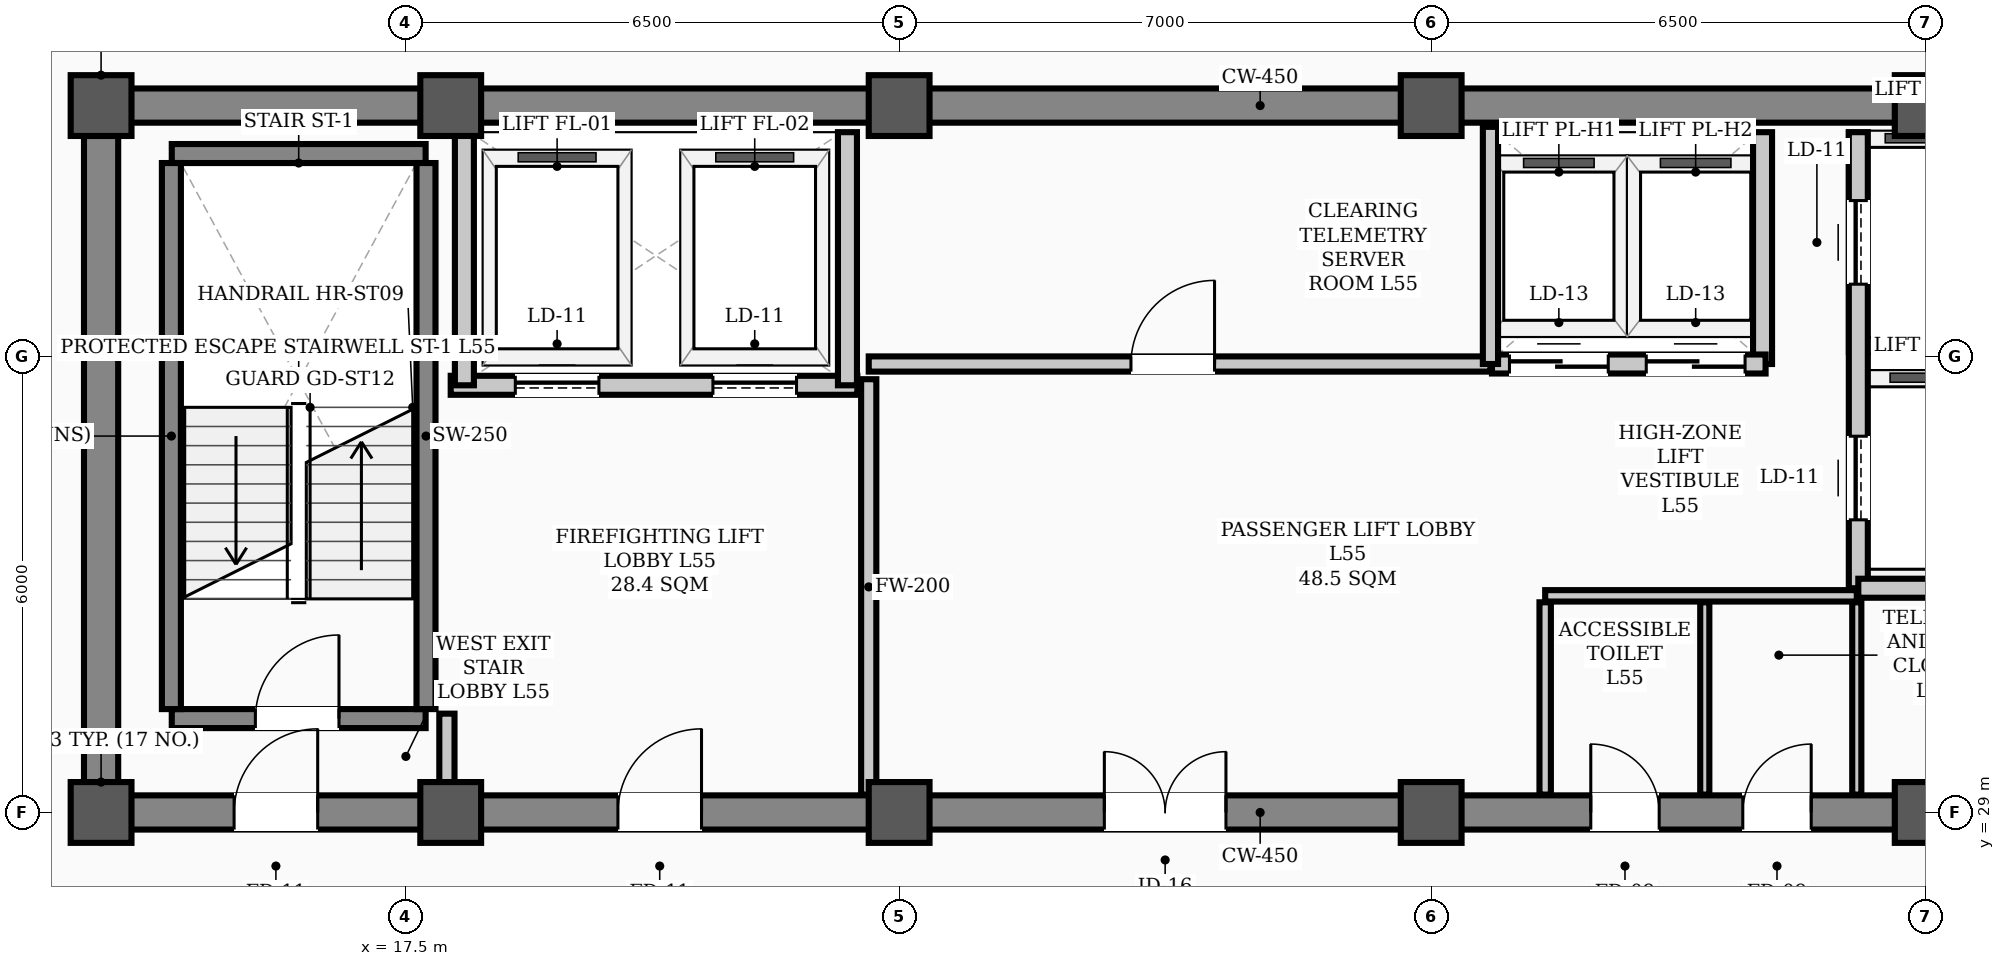
"""IFC4 building model, lengths in metres.
Left out: names, types, materials, properties, quantities, classifications, styles, units other than length and angle.
Written with IfcOpenShell. Run it as: python <this file> out.ifc"""

import sys

from ifc_helpers import new_model, si_unit, direction, frame, frame_2d, origin, origin_2d, place, context, subcontext, project, spatial, rectangle, hollow_rectangle, extrude, element, fill, save


model = new_model("IFC4")
c1 = context("Model", 3, precision=1e-05, world=origin(), true_north=direction((0.0, 1.0)))
c2 = subcontext(c1, "Body", "Model", "MODEL_VIEW")
j1 = project(units=[si_unit("LENGTHUNIT", "METRE"), si_unit("PLANEANGLEUNIT", "RADIAN")], contexts=[c1])
p1 = place(None, origin())
s1 = spatial("IfcSite", under=j1, at=p1, CompositionType="ELEMENT")
p2 = place(p1, origin())
s2 = spatial("IfcBuilding", under=s1, at=p2, CompositionType="ELEMENT")
p3 = place(p2, frame((0.0, 0.0, 222.8)))
s3 = spatial("IfcBuildingStorey", under=s2, at=p3, CompositionType="ELEMENT", Elevation=222.8)
for number, where, z_axis, x_axis in (
    (1, (13.5, 29.0, 0.0), (0.0, 0.0, 1.0), (1.0, 0.0, 0.0)),
    (2, (13.5, 38.3, 0.0), (0.0, 0.0, 1.0), (1.0, 0.0, 0.0)),
    (3, (18.1, 29.0, 0.0), (0.0, 0.0, 1.0), (1.0, 0.0, 0.0)),
    (4, (18.1, 38.3, 0.0), (0.0, 0.0, 1.0), (1.0, 0.0, 0.0)),
    (5, (24.0, 29.0, 0.0), (0.0, 0.0, 1.0), (1.0, 0.0, 0.0)),
    (6, (24.0, 38.3, 0.0), (0.0, 0.0, 1.0), (1.0, 0.0, 0.0)),
    (7, (31.0, 29.0, 0.0), (0.0, 0.0, 1.0), (1.0, 0.0, 0.0)),
    (8, (31.0, 38.3, 0.0), (0.0, 0.0, 1.0), (1.0, 0.0, 0.0)),
    (9, (37.5, 29.0, 0.0), (0.0, 0.0, 1.0), (1.0, 0.0, 0.0)),
    (10, (37.5, 38.3, 0.0), (0.0, 0.0, 1.0), (1.0, 0.0, 0.0)),
):
    element("IfcColumn", number, at=place(p3, frame(where, z_axis=z_axis, x_axis=x_axis)), inside=s3, PredefinedType="COLUMN", context=c2, shape_type="SweptSolid", body=[
        extrude(hollow_rectangle(XDim=0.8, YDim=0.8, WallThickness=0.032, InnerFilletRadius=0.016, OuterFilletRadius=0.048, at=origin_2d()), origin(), (0.0, 0.0, 1.0), 3.9),
    ])
p4 = place(p3, frame((13.5, 29.0, 0.0), z_axis=(0.0, 0.0, 1.0), x_axis=(1.0, 0.0, 0.0)))
e11 = element("IfcWall", 11, at=p4, inside=s3, PredefinedType="SHEAR", context=c2, shape_type="SweptSolid", body=[
    extrude(rectangle(XDim=30.5, YDim=0.45, at=frame_2d((15.25, 0.0))), origin(), (0.0, 0.0, 1.0), 3.72),
])
p5 = place(p4, frame((1.75, 0.0, 0.0)))
e12 = element("IfcOpeningElement", 12, at=p5, cuts=e11, PredefinedType="OPENING", context=c2, shape_type="SweptSolid", body=[
    extrude(rectangle(XDim=1.1, YDim=2.08, at=frame_2d((0.55, 1.04))), frame((0.0, 0.235, 0.0), z_axis=(0.0, -1.0, 0.0), x_axis=(1.0, 0.0, 0.0)), (0.0, 0.0, 1.0), 0.47),
])
p6 = place(p4, frame((26.7, 0.0, 0.0)))
e13 = element("IfcOpeningElement", 13, at=p6, cuts=e11, PredefinedType="OPENING", context=c2, shape_type="SweptSolid", body=[
    extrude(rectangle(XDim=1.1, YDim=2.08, at=frame_2d((0.55, 1.04))), frame((0.0, 0.235, 0.0), z_axis=(0.0, -1.0, 0.0), x_axis=(1.0, 0.0, 0.0)), (0.0, 0.0, 1.0), 0.47),
])
p7 = place(p4, frame((6.8, 0.0, 0.0)))
e14 = element("IfcOpeningElement", 14, at=p7, cuts=e11, PredefinedType="OPENING", context=c2, shape_type="SweptSolid", body=[
    extrude(rectangle(XDim=1.1, YDim=2.08, at=frame_2d((0.55, 1.04))), frame((0.0, 0.235, 0.0), z_axis=(0.0, -1.0, 0.0), x_axis=(1.0, 0.0, 0.0)), (0.0, 0.0, 1.0), 0.47),
])
p8 = place(p4, frame((13.2, 0.0, 0.0)))
e15 = element("IfcOpeningElement", 15, at=p8, cuts=e11, PredefinedType="OPENING", context=c2, shape_type="SweptSolid", body=[
    extrude(rectangle(XDim=1.6, YDim=2.08, at=frame_2d((0.8, 1.04))), frame((0.0, 0.235, 0.0), z_axis=(0.0, -1.0, 0.0), x_axis=(1.0, 0.0, 0.0)), (0.0, 0.0, 1.0), 0.47),
])
p9 = place(p4, frame((19.6, 0.0, 0.0)))
e16 = element("IfcOpeningElement", 16, at=p9, cuts=e11, PredefinedType="OPENING", context=c2, shape_type="SweptSolid", body=[
    extrude(rectangle(XDim=0.9, YDim=2.08, at=frame_2d((0.45, 1.04))), frame((0.0, 0.235, 0.0), z_axis=(0.0, -1.0, 0.0), x_axis=(1.0, 0.0, 0.0)), (0.0, 0.0, 1.0), 0.47),
])
p10 = place(p4, frame((21.6, 0.0, 0.0)))
e17 = element("IfcOpeningElement", 17, at=p10, cuts=e11, PredefinedType="OPENING", context=c2, shape_type="SweptSolid", body=[
    extrude(rectangle(XDim=0.9, YDim=2.08, at=frame_2d((0.45, 1.04))), frame((0.0, 0.235, 0.0), z_axis=(0.0, -1.0, 0.0), x_axis=(1.0, 0.0, 0.0)), (0.0, 0.0, 1.0), 0.47),
])
p11 = place(p3, frame((13.5, 38.3, 0.0), z_axis=(0.0, 0.0, 1.0), x_axis=(1.0, 0.0, 0.0)))
e18 = element("IfcWall", 18, at=p11, inside=s3, PredefinedType="SHEAR", context=c2, shape_type="SweptSolid", body=[
    extrude(rectangle(XDim=30.5, YDim=0.45, at=frame_2d((15.25, 0.0))), origin(), (0.0, 0.0, 1.0), 3.72),
])
p12 = place(p3, frame((13.5, 29.35, 0.0), z_axis=(0.0, 0.0, 1.0), x_axis=(0.0, 1.0, 0.0)))
e19 = element("IfcWall", 19, at=p12, inside=s3, PredefinedType="SHEAR", context=c2, shape_type="SweptSolid", body=[
    extrude(rectangle(XDim=8.6, YDim=0.45, at=frame_2d((4.3, 0.0))), origin(), (0.0, 0.0, 1.0), 3.72),
])
p13 = place(p3, frame((14.43, 30.235, 0.0), z_axis=(0.0, 0.0, 1.0), x_axis=(1.0, 0.0, 0.0)))
e20 = element("IfcWall", 20, at=p13, inside=s3, PredefinedType="STANDARD", context=c2, shape_type="SweptSolid", body=[
    extrude(rectangle(XDim=3.34, YDim=0.25, at=frame_2d((1.67, 0.0))), origin(), (0.0, 0.0, 1.0), 3.72),
])
p14 = place(p13, frame((1.1, 0.0, 0.0)))
e21 = element("IfcOpeningElement", 21, at=p14, cuts=e20, PredefinedType="OPENING", context=c2, shape_type="SweptSolid", body=[
    extrude(rectangle(XDim=1.1, YDim=2.08, at=frame_2d((0.55, 1.04))), frame((0.0, 0.135, 0.0), z_axis=(0.0, -1.0, 0.0), x_axis=(1.0, 0.0, 0.0)), (0.0, 0.0, 1.0), 0.27),
])
p15 = place(p3, frame((14.43, 37.669, 0.0), z_axis=(0.0, 0.0, 1.0), x_axis=(1.0, 0.0, 0.0)))
e22 = element("IfcWall", 22, at=p15, inside=s3, PredefinedType="STANDARD", context=c2, shape_type="SweptSolid", body=[
    extrude(rectangle(XDim=3.34, YDim=0.25, at=frame_2d((1.67, 0.0))), origin(), (0.0, 0.0, 1.0), 3.72),
])
for number, where, z_axis, x_axis in (
    (23, (14.425, 30.36, 0.0), (0.0, 0.0, 1.0), (0.0, 1.0, 0.0)),
    (24, (17.775, 30.36, 0.0), (0.0, 0.0, 1.0), (0.0, 1.0, 0.0)),
):
    element("IfcWall", number, at=place(p3, frame(where, z_axis=z_axis, x_axis=x_axis)), inside=s3, PredefinedType="STANDARD", context=c2, shape_type="SweptSolid", body=[
        extrude(rectangle(XDim=7.184, YDim=0.25, at=frame_2d((3.592, 0.0))), origin(), (0.0, 0.0, 1.0), 3.72),
    ])
p16 = place(p3, frame((18.1, 34.62, 0.0), z_axis=(0.0, 0.0, 1.0), x_axis=(1.0, 0.0, 0.0)))
e25 = element("IfcWall", 25, at=p16, inside=s3, PredefinedType="STANDARD", context=c2, shape_type="SweptSolid", body=[
    extrude(rectangle(XDim=5.35, YDim=0.25, at=frame_2d((2.675, 0.0))), origin(), (0.0, 0.0, 1.0), 3.72),
])
p17 = place(p16, frame((0.85, 0.0, 0.0)))
e26 = element("IfcOpeningElement", 26, at=p17, cuts=e25, PredefinedType="OPENING", context=c2, shape_type="SweptSolid", body=[
    extrude(rectangle(XDim=1.1, YDim=2.08, at=frame_2d((0.55, 1.04))), frame((0.0, 0.135, 0.0), z_axis=(0.0, -1.0, 0.0), x_axis=(1.0, 0.0, 0.0)), (0.0, 0.0, 1.0), 0.27),
])
p18 = place(p16, frame((3.45, 0.0, 0.0)))
e27 = element("IfcOpeningElement", 27, at=p18, cuts=e25, PredefinedType="OPENING", context=c2, shape_type="SweptSolid", body=[
    extrude(rectangle(XDim=1.1, YDim=2.08, at=frame_2d((0.55, 1.04))), frame((0.0, 0.135, 0.0), z_axis=(0.0, -1.0, 0.0), x_axis=(1.0, 0.0, 0.0)), (0.0, 0.0, 1.0), 0.27),
])
p19 = place(p3, frame((36.62, 31.95, 0.0), z_axis=(0.0, 0.0, 1.0), x_axis=(0.0, 1.0, 0.0)))
e28 = element("IfcWall", 28, at=p19, inside=s3, PredefinedType="STANDARD", context=c2, shape_type="SweptSolid", body=[
    extrude(rectangle(XDim=6.0, YDim=0.25, at=frame_2d((3.0, 0.0))), origin(), (0.0, 0.0, 1.0), 3.72),
])
p20 = place(p19, frame((0.9, 0.0, 0.0)))
e29 = element("IfcOpeningElement", 29, at=p20, cuts=e28, PredefinedType="OPENING", context=c2, shape_type="SweptSolid", body=[
    extrude(rectangle(XDim=1.1, YDim=2.08, at=frame_2d((0.55, 1.04))), frame((0.0, 0.135, 0.0), z_axis=(0.0, -1.0, 0.0), x_axis=(1.0, 0.0, 0.0)), (0.0, 0.0, 1.0), 0.27),
])
p21 = place(p19, frame((4.0, 0.0, 0.0)))
e30 = element("IfcOpeningElement", 30, at=p21, cuts=e28, PredefinedType="OPENING", context=c2, shape_type="SweptSolid", body=[
    extrude(rectangle(XDim=1.1, YDim=2.08, at=frame_2d((0.55, 1.04))), frame((0.0, 0.135, 0.0), z_axis=(0.0, -1.0, 0.0), x_axis=(1.0, 0.0, 0.0)), (0.0, 0.0, 1.0), 0.27),
])
p22 = place(p3, frame((36.62, 31.95, 0.0), z_axis=(0.0, 0.0, 1.0), x_axis=(1.0, 0.0, 0.0)))
e31 = element("IfcWall", 31, at=p22, inside=s3, PredefinedType="STANDARD", context=c2, shape_type="SweptSolid", body=[
    extrude(rectangle(XDim=1.9, YDim=0.25, at=frame_2d((0.95, 0.0))), origin(), (0.0, 0.0, 1.0), 3.48),
])
for number, where, z_axis, x_axis in (
    (32, (18.28, 34.62, 0.0), (0.0, 0.0, 1.0), (0.0, 1.0, 0.0)),
    (33, (23.32, 34.62, 0.0), (0.0, 0.0, 1.0), (0.0, 1.0, 0.0)),
):
    element("IfcWall", number, at=place(p3, frame(where, z_axis=z_axis, x_axis=x_axis)), inside=s3, PredefinedType="STANDARD", context=c2, shape_type="SweptSolid", body=[
        extrude(rectangle(XDim=3.33, YDim=0.25, at=frame_2d((1.665, 0.0))), origin(), (0.0, 0.0, 1.0), 3.72),
    ])
p23 = place(p3, frame((35.36, 34.9, 0.0), z_axis=(0.0, 0.0, 1.0), x_axis=(0.0, 1.0, 0.0)))
e34 = element("IfcWall", 34, at=p23, inside=s3, PredefinedType="STANDARD", context=c2, shape_type="SweptSolid", body=[
    extrude(rectangle(XDim=3.05, YDim=0.25, at=frame_2d((1.525, 0.0))), origin(), (0.0, 0.0, 1.0), 3.72),
])
p24 = place(p3, frame((31.8, 34.9, 0.0), z_axis=(0.0, 0.0, 1.0), x_axis=(1.0, 0.0, 0.0)))
e35 = element("IfcWall", 35, at=p24, inside=s3, PredefinedType="STANDARD", context=c2, shape_type="SweptSolid", body=[
    extrude(rectangle(XDim=3.6, YDim=0.25, at=frame_2d((1.8, 0.0))), origin(), (0.0, 0.0, 1.0), 3.72),
])
p25 = place(p24, frame((0.23, 0.0, 0.0)))
e36 = element("IfcOpeningElement", 36, at=p25, cuts=e35, PredefinedType="OPENING", context=c2, shape_type="SweptSolid", body=[
    extrude(rectangle(XDim=1.3, YDim=2.08, at=frame_2d((0.65, 1.04))), frame((0.0, 0.135, 0.0), z_axis=(0.0, -1.0, 0.0), x_axis=(1.0, 0.0, 0.0)), (0.0, 0.0, 1.0), 0.27),
])
p26 = place(p24, frame((2.03, 0.0, 0.0)))
e37 = element("IfcOpeningElement", 37, at=p26, cuts=e35, PredefinedType="OPENING", context=c2, shape_type="SweptSolid", body=[
    extrude(rectangle(XDim=1.3, YDim=2.08, at=frame_2d((0.65, 1.04))), frame((0.0, 0.135, 0.0), z_axis=(0.0, -1.0, 0.0), x_axis=(1.0, 0.0, 0.0)), (0.0, 0.0, 1.0), 0.27),
])
p27 = place(p3, frame((23.6, 34.9, 0.0), z_axis=(0.0, 0.0, 1.0), x_axis=(1.0, 0.0, 0.0)))
e38 = element("IfcWall", 38, at=p27, inside=s3, PredefinedType="STANDARD", context=c2, shape_type="SweptSolid", body=[
    extrude(rectangle(XDim=8.18, YDim=0.2, at=frame_2d((4.09, 0.0))), origin(), (0.0, 0.0, 1.0), 3.72),
])
p28 = place(p27, frame((3.45, 0.0, 0.0)))
e39 = element("IfcOpeningElement", 39, at=p28, cuts=e38, PredefinedType="OPENING", context=c2, shape_type="SweptSolid", body=[
    extrude(rectangle(XDim=1.1, YDim=2.08, at=frame_2d((0.55, 1.04))), frame((0.0, 0.11, 0.0), z_axis=(0.0, -1.0, 0.0), x_axis=(1.0, 0.0, 0.0)), (0.0, 0.0, 1.0), 0.22),
])
p29 = place(p3, frame((32.5, 31.85, 0.0), z_axis=(0.0, 0.0, 1.0), x_axis=(1.0, 0.0, 0.0)))
e40 = element("IfcWall", 40, at=p29, inside=s3, PredefinedType="PARTITIONING", context=c2, shape_type="SweptSolid", body=[
    extrude(rectangle(XDim=4.1, YDim=0.15, at=frame_2d((2.05, 0.0))), origin(), (0.0, 0.0, 1.0), 3.72),
])
p30 = place(p3, frame((18.05, 29.235, 0.0), z_axis=(0.0, 0.0, 1.0), x_axis=(0.0, 1.0, 0.0)))
e41 = element("IfcWall", 41, at=p30, inside=s3, PredefinedType="STANDARD", context=c2, shape_type="SweptSolid", body=[
    extrude(rectangle(XDim=1.065, YDim=0.2, at=frame_2d((0.532, 0.0))), origin(), (0.0, 0.0, 1.0), 3.35),
])
p31 = place(p3, frame((23.6, 29.235, 0.0), z_axis=(0.0, 0.0, 1.0), x_axis=(0.0, 1.0, 0.0)))
e42 = element("IfcWall", 42, at=p31, inside=s3, PredefinedType="STANDARD", context=c2, shape_type="SweptSolid", body=[
    extrude(rectangle(XDim=5.465, YDim=0.2, at=frame_2d((2.732, 0.0))), origin(), (0.0, 0.0, 1.0), 3.2),
])
p32 = place(p3, frame((32.5, 29.235, 0.0), z_axis=(0.0, 0.0, 1.0), x_axis=(0.0, 1.0, 0.0)))
e43 = element("IfcWall", 43, at=p32, inside=s3, PredefinedType="PARTITIONING", context=c2, shape_type="SweptSolid", body=[
    extrude(rectangle(XDim=2.53, YDim=0.15, at=frame_2d((1.265, 0.0))), origin(), (0.0, 0.0, 1.0), 3.35),
])
for number, where, z_axis, x_axis in (
    (44, (36.6, 29.235, 0.0), (0.0, 0.0, 1.0), (0.0, 1.0, 0.0)),
    (45, (34.6, 29.235, 0.0), (0.0, 0.0, 1.0), (0.0, 1.0, 0.0)),
):
    element("IfcWall", number, at=place(p3, frame(where, z_axis=z_axis, x_axis=x_axis)), inside=s3, PredefinedType="PARTITIONING", context=c2, shape_type="SweptSolid", body=[
        extrude(rectangle(XDim=2.53, YDim=0.12, at=frame_2d((1.265, 0.0))), origin(), (0.0, 0.0, 1.0), 3.35),
    ])
p33 = place(p3, frame((31.78, 34.9, 0.0), z_axis=(0.0, 0.0, 1.0), x_axis=(0.0, 1.0, 0.0)))
e46 = element("IfcWall", 46, at=p33, inside=s3, PredefinedType="STANDARD", context=c2, shape_type="SweptSolid", body=[
    extrude(rectangle(XDim=3.12, YDim=0.2, at=frame_2d((1.56, 0.0))), origin(), (0.0, 0.0, 1.0), 3.72),
])
p34 = place(p14, origin())
e47 = element("IfcDoor", 47, at=p34, inside=s3, OperationType="SINGLE_SWING_RIGHT", PredefinedType="DOOR", context=c2, shape_type="SweptSolid", body=[
    extrude(rectangle(XDim=1.1, YDim=2.08, at=frame_2d((0.55, 1.04))), frame((0.0, 0.025, 0.0), z_axis=(0.0, -1.0, 0.0), x_axis=(1.0, 0.0, 0.0)), (0.0, 0.0, 1.0), 0.05),
])
fill(e21, e47)
p35 = place(p5, origin())
e48 = element("IfcDoor", 48, at=p35, inside=s3, OperationType="SINGLE_SWING_RIGHT", PredefinedType="DOOR", context=c2, shape_type="SweptSolid", body=[
    extrude(rectangle(XDim=1.1, YDim=2.08, at=frame_2d((0.55, 1.04))), frame((0.0, 0.025, 0.0), z_axis=(0.0, -1.0, 0.0), x_axis=(1.0, 0.0, 0.0)), (0.0, 0.0, 1.0), 0.05),
])
fill(e12, e48)
p36 = place(p7, origin())
e49 = element("IfcDoor", 49, at=p36, inside=s3, OperationType="SINGLE_SWING_RIGHT", PredefinedType="DOOR", context=c2, shape_type="SweptSolid", body=[
    extrude(rectangle(XDim=1.1, YDim=2.08, at=frame_2d((0.55, 1.04))), frame((0.0, 0.025, 0.0), z_axis=(0.0, -1.0, 0.0), x_axis=(1.0, 0.0, 0.0)), (0.0, 0.0, 1.0), 0.05),
])
fill(e14, e49)
p37 = place(p8, origin())
e50 = element("IfcDoor", 50, at=p37, inside=s3, OperationType="DOUBLE_DOOR_SINGLE_SWING", PredefinedType="DOOR", context=c2, shape_type="SweptSolid", body=[
    extrude(rectangle(XDim=1.6, YDim=2.08, at=frame_2d((0.8, 1.04))), frame((0.0, 0.025, 0.0), z_axis=(0.0, -1.0, 0.0), x_axis=(1.0, 0.0, 0.0)), (0.0, 0.0, 1.0), 0.05),
])
fill(e15, e50)
p38 = place(p28, origin())
e51 = element("IfcDoor", 51, at=p38, inside=s3, OperationType="SINGLE_SWING_RIGHT", PredefinedType="DOOR", context=c2, shape_type="SweptSolid", body=[
    extrude(rectangle(XDim=1.1, YDim=2.08, at=frame_2d((0.55, 1.04))), frame((0.0, 0.025, 0.0), z_axis=(0.0, -1.0, 0.0), x_axis=(1.0, 0.0, 0.0)), (0.0, 0.0, 1.0), 0.05),
])
fill(e39, e51)
p39 = place(p9, origin())
e52 = element("IfcDoor", 52, at=p39, inside=s3, OperationType="SINGLE_SWING_LEFT", PredefinedType="DOOR", context=c2, shape_type="SweptSolid", body=[
    extrude(rectangle(XDim=0.9, YDim=2.08, at=frame_2d((0.45, 1.04))), frame((0.0, 0.025, 0.0), z_axis=(0.0, -1.0, 0.0), x_axis=(1.0, 0.0, 0.0)), (0.0, 0.0, 1.0), 0.05),
])
fill(e16, e52)
p40 = place(p10, origin())
e53 = element("IfcDoor", 53, at=p40, inside=s3, OperationType="SINGLE_SWING_RIGHT", PredefinedType="DOOR", context=c2, shape_type="SweptSolid", body=[
    extrude(rectangle(XDim=0.9, YDim=2.08, at=frame_2d((0.45, 1.04))), frame((0.0, 0.025, 0.0), z_axis=(0.0, -1.0, 0.0), x_axis=(1.0, 0.0, 0.0)), (0.0, 0.0, 1.0), 0.05),
])
fill(e17, e53)
p41 = place(p17, origin())
e54 = element("IfcDoor", 54, at=p41, inside=s3, OperationType="SLIDING_TO_LEFT", PredefinedType="DOOR", context=c2, shape_type="SweptSolid", body=[
    extrude(rectangle(XDim=1.1, YDim=2.08, at=frame_2d((0.55, 1.04))), frame((0.0, 0.025, 0.0), z_axis=(0.0, -1.0, 0.0), x_axis=(1.0, 0.0, 0.0)), (0.0, 0.0, 1.0), 0.05),
])
fill(e26, e54)
p42 = place(p18, origin())
e55 = element("IfcDoor", 55, at=p42, inside=s3, OperationType="SLIDING_TO_LEFT", PredefinedType="DOOR", context=c2, shape_type="SweptSolid", body=[
    extrude(rectangle(XDim=1.1, YDim=2.08, at=frame_2d((0.55, 1.04))), frame((0.0, 0.025, 0.0), z_axis=(0.0, -1.0, 0.0), x_axis=(1.0, 0.0, 0.0)), (0.0, 0.0, 1.0), 0.05),
])
fill(e27, e55)
p43 = place(p20, origin())
e56 = element("IfcDoor", 56, at=p43, inside=s3, OperationType="SLIDING_TO_LEFT", PredefinedType="DOOR", context=c2, shape_type="SweptSolid", body=[
    extrude(rectangle(XDim=1.1, YDim=2.08, at=frame_2d((0.55, 1.04))), frame((0.0, 0.025, 0.0), z_axis=(0.0, -1.0, 0.0), x_axis=(1.0, 0.0, 0.0)), (0.0, 0.0, 1.0), 0.05),
])
fill(e29, e56)
p44 = place(p21, origin())
e57 = element("IfcDoor", 57, at=p44, inside=s3, OperationType="SLIDING_TO_LEFT", PredefinedType="DOOR", context=c2, shape_type="SweptSolid", body=[
    extrude(rectangle(XDim=1.1, YDim=2.08, at=frame_2d((0.55, 1.04))), frame((0.0, 0.025, 0.0), z_axis=(0.0, -1.0, 0.0), x_axis=(1.0, 0.0, 0.0)), (0.0, 0.0, 1.0), 0.05),
])
fill(e30, e57)
p45 = place(p25, origin())
e58 = element("IfcDoor", 58, at=p45, inside=s3, OperationType="DOUBLE_DOOR_SLIDING", PredefinedType="DOOR", context=c2, shape_type="SweptSolid", body=[
    extrude(rectangle(XDim=1.3, YDim=2.08, at=frame_2d((0.65, 1.04))), frame((0.0, 0.025, 0.0), z_axis=(0.0, -1.0, 0.0), x_axis=(1.0, 0.0, 0.0)), (0.0, 0.0, 1.0), 0.05),
])
fill(e36, e58)
p46 = place(p26, origin())
e59 = element("IfcDoor", 59, at=p46, inside=s3, OperationType="DOUBLE_DOOR_SLIDING", PredefinedType="DOOR", context=c2, shape_type="SweptSolid", body=[
    extrude(rectangle(XDim=1.3, YDim=2.08, at=frame_2d((0.65, 1.04))), frame((0.0, 0.025, 0.0), z_axis=(0.0, -1.0, 0.0), x_axis=(1.0, 0.0, 0.0)), (0.0, 0.0, 1.0), 0.05),
])
fill(e37, e59)
save(model, sys.argv[1])
